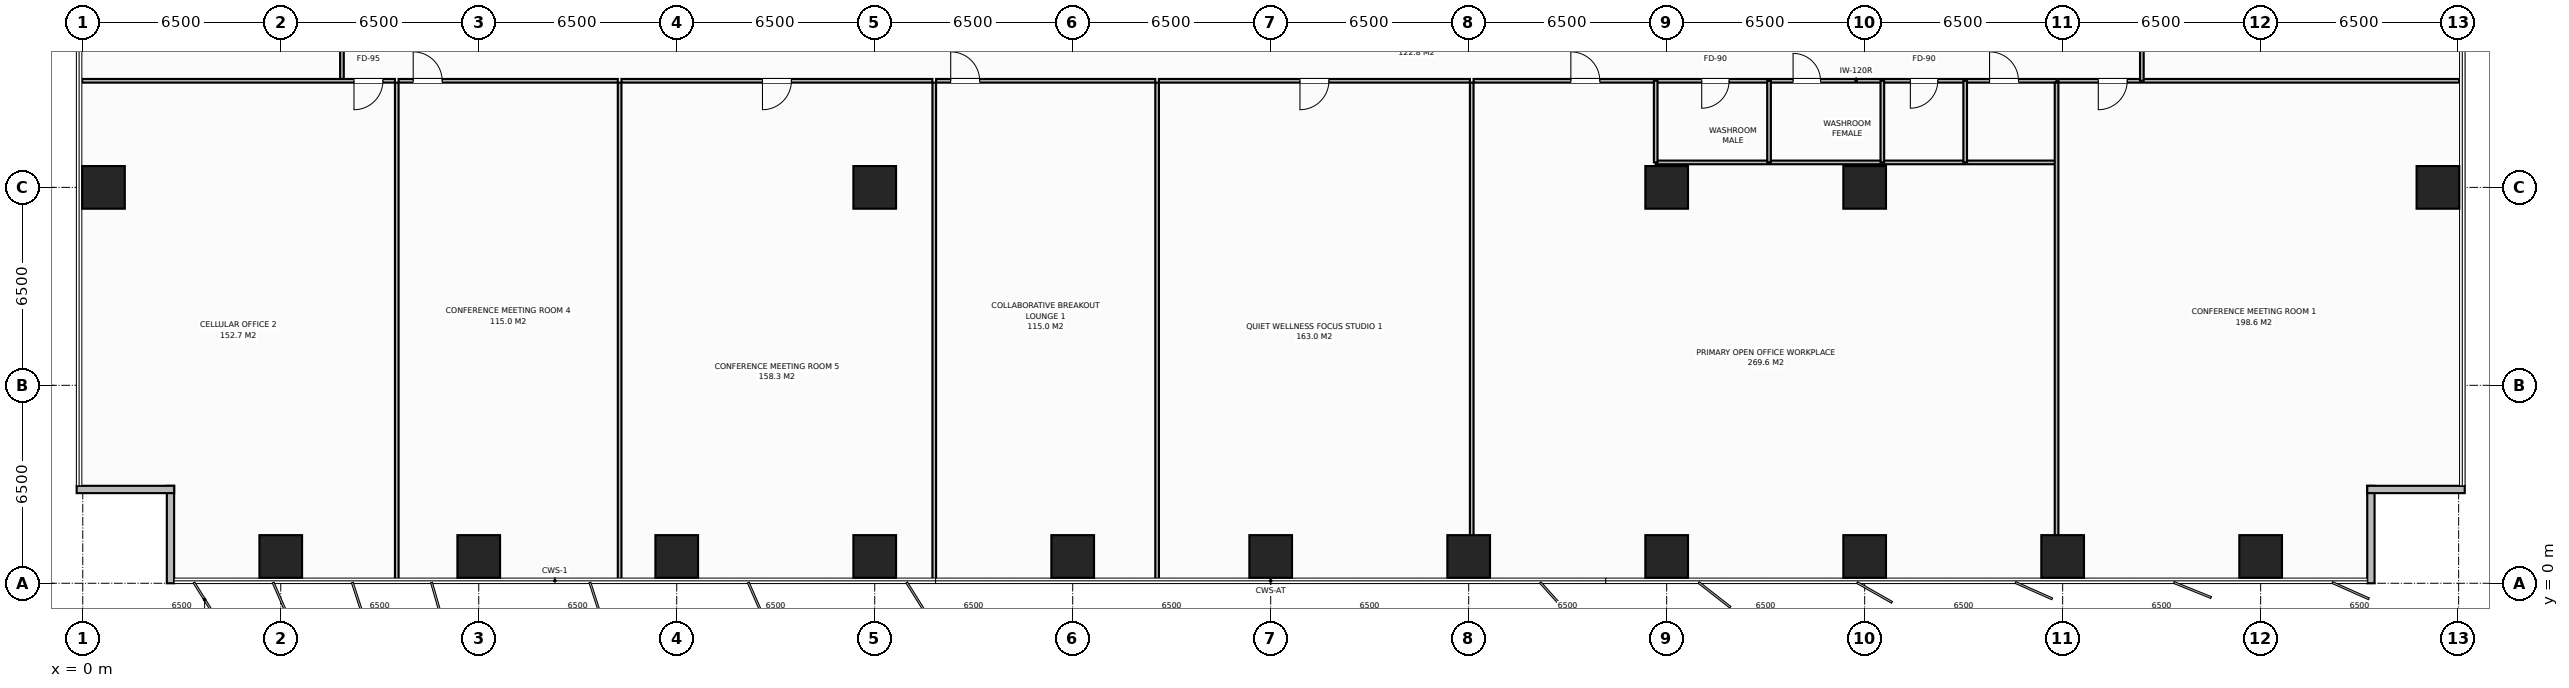
"""IFC4 building model, lengths in metres.
Left out: names, types, materials, properties, quantities, classifications, styles, units other than length and angle.
Written with IfcOpenShell. Run it as: python <this file> out.ifc"""

import sys

from ifc_helpers import new_model, si_unit, direction, frame, frame_2d, origin, origin_2d, place, context, subcontext, project, spatial, rectangle, extrude, element, fill, save


model = new_model("IFC4")
c1 = context("Model", 3, precision=1e-05, world=origin(), true_north=direction((0.0, 1.0)))
c2 = subcontext(c1, "Body", "Model", "MODEL_VIEW")
j1 = project(units=[si_unit("LENGTHUNIT", "METRE"), si_unit("PLANEANGLEUNIT", "RADIAN")], contexts=[c1])
p1 = place(None, origin())
s1 = spatial("IfcSite", under=j1, at=p1, CompositionType="ELEMENT")
p2 = place(p1, origin())
s2 = spatial("IfcBuilding", under=s1, at=p2, CompositionType="ELEMENT")
p3 = place(p2, frame((0.0, 0.0, 69.6)))
s3 = spatial("IfcBuildingStorey", under=s2, at=p3, CompositionType="ELEMENT", Elevation=69.6)
for number, where, z_axis, x_axis in (
    (1, (58.5, 13.0, 0.0), (0.0, 0.0, 1.0), (1.0, 0.0, 0.0)),
    (2, (26.0, 13.0, 0.0), (0.0, 0.0, 1.0), (1.0, 0.0, 0.0)),
    (3, (52.0, 13.0, 0.0), (0.0, 0.0, 1.0), (1.0, 0.0, 0.0)),
    (4, (6.5, 0.88, 0.0), (0.0, 0.0, 1.0), (1.0, 0.0, 0.0)),
    (5, (13.0, 0.88, 0.0), (0.0, 0.0, 1.0), (1.0, 0.0, 0.0)),
    (6, (19.5, 0.88, 0.0), (0.0, 0.0, 1.0), (1.0, 0.0, 0.0)),
    (7, (26.0, 0.88, 0.0), (0.0, 0.0, 1.0), (1.0, 0.0, 0.0)),
    (8, (32.5, 0.88, 0.0), (0.0, 0.0, 1.0), (1.0, 0.0, 0.0)),
    (9, (39.0, 0.88, 0.0), (0.0, 0.0, 1.0), (1.0, 0.0, 0.0)),
    (10, (45.5, 0.88, 0.0), (0.0, 0.0, 1.0), (1.0, 0.0, 0.0)),
    (11, (52.0, 0.88, 0.0), (0.0, 0.0, 1.0), (1.0, 0.0, 0.0)),
    (12, (58.5, 0.88, 0.0), (0.0, 0.0, 1.0), (1.0, 0.0, 0.0)),
    (13, (65.0, 0.88, 0.0), (0.0, 0.0, 1.0), (1.0, 0.0, 0.0)),
    (14, (71.5, 0.88, 0.0), (0.0, 0.0, 1.0), (1.0, 0.0, 0.0)),
    (15, (0.68, 13.0, 0.0), (0.0, 0.0, 1.0), (1.0, 0.0, 0.0)),
    (16, (77.32, 13.0, 0.0), (0.0, 0.0, 1.0), (1.0, 0.0, 0.0)),
):
    element("IfcColumn", number, at=place(p3, frame(where, z_axis=z_axis, x_axis=x_axis)), inside=s3, PredefinedType="COLUMN", context=c2, shape_type="SweptSolid", body=[
        extrude(rectangle(XDim=1.4, YDim=1.4, at=origin_2d()), origin(), (0.0, 0.0, 1.0), 3.8),
    ])
for number, where, z_axis, x_axis in (
    (17, (2.88, 0.0, 0.0), (0.0, 0.0, 1.0), (0.0, 1.0, 0.0)),
    (18, (3.0, 3.08, 0.0), (0.0, 0.0, 1.0), (-1.0, 0.0, 0.0)),
    (19, (75.12, 3.2, 0.0), (0.0, 0.0, 1.0), (0.0, -1.0, 0.0)),
    (20, (78.2, 3.08, 0.0), (0.0, 0.0, 1.0), (-1.0, 0.0, 0.0)),
):
    element("IfcWall", number, at=place(p3, frame(where, z_axis=z_axis, x_axis=x_axis)), inside=s3, PredefinedType="STANDARD", context=c2, shape_type="SweptSolid", body=[
        extrude(rectangle(XDim=3.2, YDim=0.24, at=frame_2d((1.6, 0.0))), origin(), (0.0, 0.0, 1.0), 3.55),
    ])
p4 = place(p3, frame((8.509, 16.5, 0.0), z_axis=(0.0, 0.0, 1.0), x_axis=(0.0, 1.0, 0.0)))
e21 = element("IfcWall", 21, at=p4, inside=s3, PredefinedType="PARTITIONING", context=c2, shape_type="SweptSolid", body=[
    extrude(rectangle(XDim=2.1, YDim=0.12, at=frame_2d((1.05, 0.0))), origin(), (0.0, 0.0, 1.0), 3.55),
])
p5 = place(p3, frame((51.64, 16.5, 0.0), z_axis=(0.0, 0.0, 1.0), x_axis=(1.0, 0.0, 0.0)))
e22 = element("IfcWall", 22, at=p5, inside=s3, PredefinedType="PARTITIONING", context=c2, shape_type="SweptSolid", body=[
    extrude(rectangle(XDim=13.16, YDim=0.12, at=frame_2d((6.58, 0.0))), origin(), (0.0, 0.0, 1.0), 3.55),
])
p6 = place(p5, frame((1.51, 0.0, 0.0)))
e23 = element("IfcOpeningElement", 23, at=p6, cuts=e22, PredefinedType="OPENING", context=c2, shape_type="SweptSolid", body=[
    extrude(rectangle(XDim=0.9, YDim=2.15, at=frame_2d((0.45, 1.075))), frame((0.0, 0.07, 0.0), z_axis=(0.0, -1.0, 0.0), x_axis=(1.0, 0.0, 0.0)), (0.0, 0.0, 1.0), 0.14),
])
p7 = place(p5, frame((4.51, 0.0, 0.0)))
e24 = element("IfcOpeningElement", 24, at=p7, cuts=e22, PredefinedType="OPENING", context=c2, shape_type="SweptSolid", body=[
    extrude(rectangle(XDim=0.9, YDim=2.15, at=frame_2d((0.45, 1.075))), frame((0.0, 0.07, 0.0), z_axis=(0.0, -1.0, 0.0), x_axis=(1.0, 0.0, 0.0)), (0.0, 0.0, 1.0), 0.14),
])
p8 = place(p5, frame((8.36, 0.0, 0.0)))
e25 = element("IfcOpeningElement", 25, at=p8, cuts=e22, PredefinedType="OPENING", context=c2, shape_type="SweptSolid", body=[
    extrude(rectangle(XDim=0.9, YDim=2.15, at=frame_2d((0.45, 1.075))), frame((0.0, 0.07, 0.0), z_axis=(0.0, -1.0, 0.0), x_axis=(1.0, 0.0, 0.0)), (0.0, 0.0, 1.0), 0.14),
])
p9 = place(p5, frame((10.96, 0.0, 0.0)))
e26 = element("IfcOpeningElement", 26, at=p9, cuts=e22, PredefinedType="OPENING", context=c2, shape_type="SweptSolid", body=[
    extrude(rectangle(XDim=0.95, YDim=2.15, at=frame_2d((0.475, 1.075))), frame((0.0, 0.07, 0.0), z_axis=(0.0, -1.0, 0.0), x_axis=(1.0, 0.0, 0.0)), (0.0, 0.0, 1.0), 0.14),
])
p10 = place(p3, frame((51.64, 13.82, 0.0), z_axis=(0.0, 0.0, 1.0), x_axis=(1.0, 0.0, 0.0)))
e27 = element("IfcWall", 27, at=p10, inside=s3, PredefinedType="PARTITIONING", context=c2, shape_type="SweptSolid", body=[
    extrude(rectangle(XDim=13.16, YDim=0.12, at=frame_2d((6.58, 0.0))), origin(), (0.0, 0.0, 1.0), 3.55),
])
for number, where, z_axis, x_axis in (
    (28, (51.64, 13.82, 0.0), (0.0, 0.0, 1.0), (0.0, 1.0, 0.0)),
    (29, (55.36, 13.82, 0.0), (0.0, 0.0, 1.0), (0.0, 1.0, 0.0)),
    (30, (59.08, 13.82, 0.0), (0.0, 0.0, 1.0), (0.0, 1.0, 0.0)),
    (31, (61.8, 13.82, 0.0), (0.0, 0.0, 1.0), (0.0, 1.0, 0.0)),
):
    element("IfcWall", number, at=place(p3, frame(where, z_axis=z_axis, x_axis=x_axis)), inside=s3, PredefinedType="PARTITIONING", context=c2, shape_type="SweptSolid", body=[
        extrude(rectangle(XDim=2.68, YDim=0.12, at=frame_2d((1.34, 0.0))), origin(), (0.0, 0.0, 1.0), 3.55),
    ])
p11 = place(p3, frame((10.309, 0.02, 0.0), z_axis=(0.0, 0.0, 1.0), x_axis=(0.0, 1.0, 0.0)))
e32 = element("IfcWall", 32, at=p11, inside=s3, PredefinedType="PARTITIONING", context=c2, shape_type="SweptSolid", body=[
    extrude(rectangle(XDim=16.42, YDim=0.12, at=frame_2d((8.21, 0.0))), origin(), (0.0, 0.0, 1.0), 3.55),
])
p12 = place(p3, frame((-0.02, 16.5, 0.0), z_axis=(0.0, 0.0, 1.0), x_axis=(1.0, 0.0, 0.0)))
e33 = element("IfcWall", 33, at=p12, inside=s3, PredefinedType="PARTITIONING", context=c2, shape_type="SweptSolid", body=[
    extrude(rectangle(XDim=10.269, YDim=0.12, at=frame_2d((5.135, 0.0))), origin(), (0.0, 0.0, 1.0), 3.55),
])
p13 = place(p12, frame((8.924, 0.0, 0.0)))
e34 = element("IfcOpeningElement", 34, at=p13, cuts=e33, PredefinedType="OPENING", context=c2, shape_type="SweptSolid", body=[
    extrude(rectangle(XDim=0.95, YDim=2.15, at=frame_2d((0.475, 1.075))), frame((0.0, 0.07, 0.0), z_axis=(0.0, -1.0, 0.0), x_axis=(1.0, 0.0, 0.0)), (0.0, 0.0, 1.0), 0.14),
])
p14 = place(p3, frame((17.625, 0.02, 0.0), z_axis=(0.0, 0.0, 1.0), x_axis=(0.0, 1.0, 0.0)))
e35 = element("IfcWall", 35, at=p14, inside=s3, PredefinedType="PARTITIONING", context=c2, shape_type="SweptSolid", body=[
    extrude(rectangle(XDim=16.42, YDim=0.12, at=frame_2d((8.21, 0.0))), origin(), (0.0, 0.0, 1.0), 3.55),
])
p15 = place(p3, frame((10.369, 16.5, 0.0), z_axis=(0.0, 0.0, 1.0), x_axis=(1.0, 0.0, 0.0)))
e36 = element("IfcWall", 36, at=p15, inside=s3, PredefinedType="PARTITIONING", context=c2, shape_type="SweptSolid", body=[
    extrude(rectangle(XDim=7.196, YDim=0.12, at=frame_2d((3.598, 0.0))), origin(), (0.0, 0.0, 1.0), 3.55),
])
p16 = place(p15, frame((0.48, 0.0, 0.0)))
e37 = element("IfcOpeningElement", 37, at=p16, cuts=e36, PredefinedType="OPENING", context=c2, shape_type="SweptSolid", body=[
    extrude(rectangle(XDim=0.95, YDim=2.15, at=frame_2d((0.475, 1.075))), frame((0.0, 0.07, 0.0), z_axis=(0.0, -1.0, 0.0), x_axis=(1.0, 0.0, 0.0)), (0.0, 0.0, 1.0), 0.14),
])
p17 = place(p3, frame((27.955, 0.02, 0.0), z_axis=(0.0, 0.0, 1.0), x_axis=(0.0, 1.0, 0.0)))
e38 = element("IfcWall", 38, at=p17, inside=s3, PredefinedType="PARTITIONING", context=c2, shape_type="SweptSolid", body=[
    extrude(rectangle(XDim=16.42, YDim=0.12, at=frame_2d((8.21, 0.0))), origin(), (0.0, 0.0, 1.0), 3.55),
])
p18 = place(p3, frame((17.686, 16.5, 0.0), z_axis=(0.0, 0.0, 1.0), x_axis=(1.0, 0.0, 0.0)))
e39 = element("IfcWall", 39, at=p18, inside=s3, PredefinedType="PARTITIONING", context=c2, shape_type="SweptSolid", body=[
    extrude(rectangle(XDim=10.209, YDim=0.12, at=frame_2d((5.104, 0.0))), origin(), (0.0, 0.0, 1.0), 3.55),
])
p19 = place(p18, frame((4.629, 0.0, 0.0)))
e40 = element("IfcOpeningElement", 40, at=p19, cuts=e39, PredefinedType="OPENING", context=c2, shape_type="SweptSolid", body=[
    extrude(rectangle(XDim=0.95, YDim=2.15, at=frame_2d((0.475, 1.075))), frame((0.0, 0.07, 0.0), z_axis=(0.0, -1.0, 0.0), x_axis=(1.0, 0.0, 0.0)), (0.0, 0.0, 1.0), 0.14),
])
p20 = place(p3, frame((35.271, 0.02, 0.0), z_axis=(0.0, 0.0, 1.0), x_axis=(0.0, 1.0, 0.0)))
e41 = element("IfcWall", 41, at=p20, inside=s3, PredefinedType="PARTITIONING", context=c2, shape_type="SweptSolid", body=[
    extrude(rectangle(XDim=16.42, YDim=0.12, at=frame_2d((8.21, 0.0))), origin(), (0.0, 0.0, 1.0), 3.55),
])
p21 = place(p3, frame((28.014, 16.5, 0.0), z_axis=(0.0, 0.0, 1.0), x_axis=(1.0, 0.0, 0.0)))
e42 = element("IfcWall", 42, at=p21, inside=s3, PredefinedType="PARTITIONING", context=c2, shape_type="SweptSolid", body=[
    extrude(rectangle(XDim=7.197, YDim=0.12, at=frame_2d((3.598, 0.0))), origin(), (0.0, 0.0, 1.0), 3.55),
])
p22 = place(p21, frame((0.48, 0.0, 0.0)))
e43 = element("IfcOpeningElement", 43, at=p22, cuts=e42, PredefinedType="OPENING", context=c2, shape_type="SweptSolid", body=[
    extrude(rectangle(XDim=0.95, YDim=2.15, at=frame_2d((0.475, 1.075))), frame((0.0, 0.07, 0.0), z_axis=(0.0, -1.0, 0.0), x_axis=(1.0, 0.0, 0.0)), (0.0, 0.0, 1.0), 0.14),
])
p23 = place(p3, frame((45.6, 0.02, 0.0), z_axis=(0.0, 0.0, 1.0), x_axis=(0.0, 1.0, 0.0)))
e44 = element("IfcWall", 44, at=p23, inside=s3, PredefinedType="PARTITIONING", context=c2, shape_type="SweptSolid", body=[
    extrude(rectangle(XDim=16.42, YDim=0.12, at=frame_2d((8.21, 0.0))), origin(), (0.0, 0.0, 1.0), 2.9),
])
p24 = place(p3, frame((35.331, 16.5, 0.0), z_axis=(0.0, 0.0, 1.0), x_axis=(1.0, 0.0, 0.0)))
e45 = element("IfcWall", 45, at=p24, inside=s3, PredefinedType="PARTITIONING", context=c2, shape_type="SweptSolid", body=[
    extrude(rectangle(XDim=10.209, YDim=0.12, at=frame_2d((5.104, 0.0))), origin(), (0.0, 0.0, 1.0), 3.55),
])
p25 = place(p24, frame((4.63, 0.0, 0.0)))
e46 = element("IfcOpeningElement", 46, at=p25, cuts=e45, PredefinedType="OPENING", context=c2, shape_type="SweptSolid", body=[
    extrude(rectangle(XDim=0.95, YDim=2.15, at=frame_2d((0.475, 1.075))), frame((0.0, 0.07, 0.0), z_axis=(0.0, -1.0, 0.0), x_axis=(1.0, 0.0, 0.0)), (0.0, 0.0, 1.0), 0.14),
])
p26 = place(p3, frame((64.8, 0.02, 0.0), z_axis=(0.0, 0.0, 1.0), x_axis=(0.0, 1.0, 0.0)))
e47 = element("IfcWall", 47, at=p26, inside=s3, PredefinedType="PARTITIONING", context=c2, shape_type="SweptSolid", body=[
    extrude(rectangle(XDim=16.42, YDim=0.12, at=frame_2d((8.21, 0.0))), origin(), (0.0, 0.0, 1.0), 2.9),
])
p27 = place(p3, frame((45.66, 16.5, 0.0), z_axis=(0.0, 0.0, 1.0), x_axis=(1.0, 0.0, 0.0)))
e48 = element("IfcWall", 48, at=p27, inside=s3, PredefinedType="PARTITIONING", context=c2, shape_type="SweptSolid", body=[
    extrude(rectangle(XDim=5.92, YDim=0.12, at=frame_2d((2.96, 0.0))), origin(), (0.0, 0.0, 1.0), 3.55),
])
p28 = place(p27, frame((3.194, 0.0, 0.0)))
e49 = element("IfcOpeningElement", 49, at=p28, cuts=e48, PredefinedType="OPENING", context=c2, shape_type="SweptSolid", body=[
    extrude(rectangle(XDim=0.95, YDim=2.15, at=frame_2d((0.475, 1.075))), frame((0.0, 0.07, 0.0), z_axis=(0.0, -1.0, 0.0), x_axis=(1.0, 0.0, 0.0)), (0.0, 0.0, 1.0), 0.14),
])
p29 = place(p3, frame((64.86, 16.5, 0.0), z_axis=(0.0, 0.0, 1.0), x_axis=(1.0, 0.0, 0.0)))
e50 = element("IfcWall", 50, at=p29, inside=s3, PredefinedType="PARTITIONING", context=c2, shape_type="SweptSolid", body=[
    extrude(rectangle(XDim=13.16, YDim=0.12, at=frame_2d((6.58, 0.0))), origin(), (0.0, 0.0, 1.0), 3.55),
])
p30 = place(p29, frame((1.31, 0.0, 0.0)))
e51 = element("IfcOpeningElement", 51, at=p30, cuts=e50, PredefinedType="OPENING", context=c2, shape_type="SweptSolid", body=[
    extrude(rectangle(XDim=0.95, YDim=2.15, at=frame_2d((0.475, 1.075))), frame((0.0, 0.07, 0.0), z_axis=(0.0, -1.0, 0.0), x_axis=(1.0, 0.0, 0.0)), (0.0, 0.0, 1.0), 0.14),
])
p31 = place(p3, frame((67.6, 16.5, 0.0), z_axis=(0.0, 0.0, 1.0), x_axis=(0.0, 1.0, 0.0)))
e52 = element("IfcWall", 52, at=p31, inside=s3, PredefinedType="PARTITIONING", context=c2, shape_type="SweptSolid", body=[
    extrude(rectangle(XDim=9.5, YDim=0.12, at=frame_2d((4.75, 0.0))), origin(), (0.0, 0.0, 1.0), 3.55),
])
p32 = place(p31, frame((5.325, 0.0, 0.0)))
e53 = element("IfcOpeningElement", 53, at=p32, cuts=e52, PredefinedType="OPENING", context=c2, shape_type="SweptSolid", body=[
    extrude(rectangle(XDim=0.95, YDim=2.15, at=frame_2d((0.475, 1.075))), frame((0.0, 0.07, 0.0), z_axis=(0.0, -1.0, 0.0), x_axis=(1.0, 0.0, 0.0)), (0.0, 0.0, 1.0), 0.14),
])
p33 = place(p6, origin())
e54 = element("IfcDoor", 54, at=p33, inside=s3, OperationType="SINGLE_SWING_RIGHT", PredefinedType="DOOR", context=c2, shape_type="SweptSolid", body=[
    extrude(rectangle(XDim=0.9, YDim=2.15, at=frame_2d((0.45, 1.075))), frame((0.0, 0.025, 0.0), z_axis=(0.0, -1.0, 0.0), x_axis=(1.0, 0.0, 0.0)), (0.0, 0.0, 1.0), 0.05),
])
fill(e23, e54)
p34 = place(p7, origin())
e55 = element("IfcDoor", 55, at=p34, inside=s3, OperationType="SINGLE_SWING_LEFT", PredefinedType="DOOR", context=c2, shape_type="SweptSolid", body=[
    extrude(rectangle(XDim=0.9, YDim=2.15, at=frame_2d((0.45, 1.075))), frame((0.0, 0.025, 0.0), z_axis=(0.0, -1.0, 0.0), x_axis=(1.0, 0.0, 0.0)), (0.0, 0.0, 1.0), 0.05),
])
fill(e24, e55)
p35 = place(p8, origin())
e56 = element("IfcDoor", 56, at=p35, inside=s3, OperationType="SINGLE_SWING_RIGHT", PredefinedType="DOOR", context=c2, shape_type="SweptSolid", body=[
    extrude(rectangle(XDim=0.9, YDim=2.15, at=frame_2d((0.45, 1.075))), frame((0.0, 0.025, 0.0), z_axis=(0.0, -1.0, 0.0), x_axis=(1.0, 0.0, 0.0)), (0.0, 0.0, 1.0), 0.05),
])
fill(e25, e56)
p36 = place(p9, origin())
e57 = element("IfcDoor", 57, at=p36, inside=s3, OperationType="SINGLE_SWING_LEFT", PredefinedType="DOOR", context=c2, shape_type="SweptSolid", body=[
    extrude(rectangle(XDim=0.95, YDim=2.15, at=frame_2d((0.475, 1.075))), frame((0.0, 0.025, 0.0), z_axis=(0.0, -1.0, 0.0), x_axis=(1.0, 0.0, 0.0)), (0.0, 0.0, 1.0), 0.05),
])
fill(e26, e57)
p37 = place(p13, origin())
e58 = element("IfcDoor", 58, at=p37, inside=s3, OperationType="SINGLE_SWING_RIGHT", PredefinedType="DOOR", context=c2, shape_type="SweptSolid", body=[
    extrude(rectangle(XDim=0.95, YDim=2.15, at=frame_2d((0.475, 1.075))), frame((0.0, 0.025, 0.0), z_axis=(0.0, -1.0, 0.0), x_axis=(1.0, 0.0, 0.0)), (0.0, 0.0, 1.0), 0.05),
])
fill(e34, e58)
p38 = place(p16, origin())
e59 = element("IfcDoor", 59, at=p38, inside=s3, OperationType="SINGLE_SWING_LEFT", PredefinedType="DOOR", context=c2, shape_type="SweptSolid", body=[
    extrude(rectangle(XDim=0.95, YDim=2.15, at=frame_2d((0.475, 1.075))), frame((0.0, 0.025, 0.0), z_axis=(0.0, -1.0, 0.0), x_axis=(1.0, 0.0, 0.0)), (0.0, 0.0, 1.0), 0.05),
])
fill(e37, e59)
p39 = place(p19, origin())
e60 = element("IfcDoor", 60, at=p39, inside=s3, OperationType="SINGLE_SWING_RIGHT", PredefinedType="DOOR", context=c2, shape_type="SweptSolid", body=[
    extrude(rectangle(XDim=0.95, YDim=2.15, at=frame_2d((0.475, 1.075))), frame((0.0, 0.025, 0.0), z_axis=(0.0, -1.0, 0.0), x_axis=(1.0, 0.0, 0.0)), (0.0, 0.0, 1.0), 0.05),
])
fill(e40, e60)
p40 = place(p22, origin())
e61 = element("IfcDoor", 61, at=p40, inside=s3, OperationType="SINGLE_SWING_LEFT", PredefinedType="DOOR", context=c2, shape_type="SweptSolid", body=[
    extrude(rectangle(XDim=0.95, YDim=2.15, at=frame_2d((0.475, 1.075))), frame((0.0, 0.025, 0.0), z_axis=(0.0, -1.0, 0.0), x_axis=(1.0, 0.0, 0.0)), (0.0, 0.0, 1.0), 0.05),
])
fill(e43, e61)
p41 = place(p25, origin())
e62 = element("IfcDoor", 62, at=p41, inside=s3, OperationType="SINGLE_SWING_RIGHT", PredefinedType="DOOR", context=c2, shape_type="SweptSolid", body=[
    extrude(rectangle(XDim=0.95, YDim=2.15, at=frame_2d((0.475, 1.075))), frame((0.0, 0.025, 0.0), z_axis=(0.0, -1.0, 0.0), x_axis=(1.0, 0.0, 0.0)), (0.0, 0.0, 1.0), 0.05),
])
fill(e46, e62)
p42 = place(p28, origin())
e63 = element("IfcDoor", 63, at=p42, inside=s3, OperationType="SINGLE_SWING_LEFT", PredefinedType="DOOR", context=c2, shape_type="SweptSolid", body=[
    extrude(rectangle(XDim=0.95, YDim=2.15, at=frame_2d((0.475, 1.075))), frame((0.0, 0.025, 0.0), z_axis=(0.0, -1.0, 0.0), x_axis=(1.0, 0.0, 0.0)), (0.0, 0.0, 1.0), 0.05),
])
fill(e49, e63)
p43 = place(p30, origin())
e64 = element("IfcDoor", 64, at=p43, inside=s3, OperationType="SINGLE_SWING_RIGHT", PredefinedType="DOOR", context=c2, shape_type="SweptSolid", body=[
    extrude(rectangle(XDim=0.95, YDim=2.15, at=frame_2d((0.475, 1.075))), frame((0.0, 0.025, 0.0), z_axis=(0.0, -1.0, 0.0), x_axis=(1.0, 0.0, 0.0)), (0.0, 0.0, 1.0), 0.05),
])
fill(e51, e64)
save(model, sys.argv[1])
